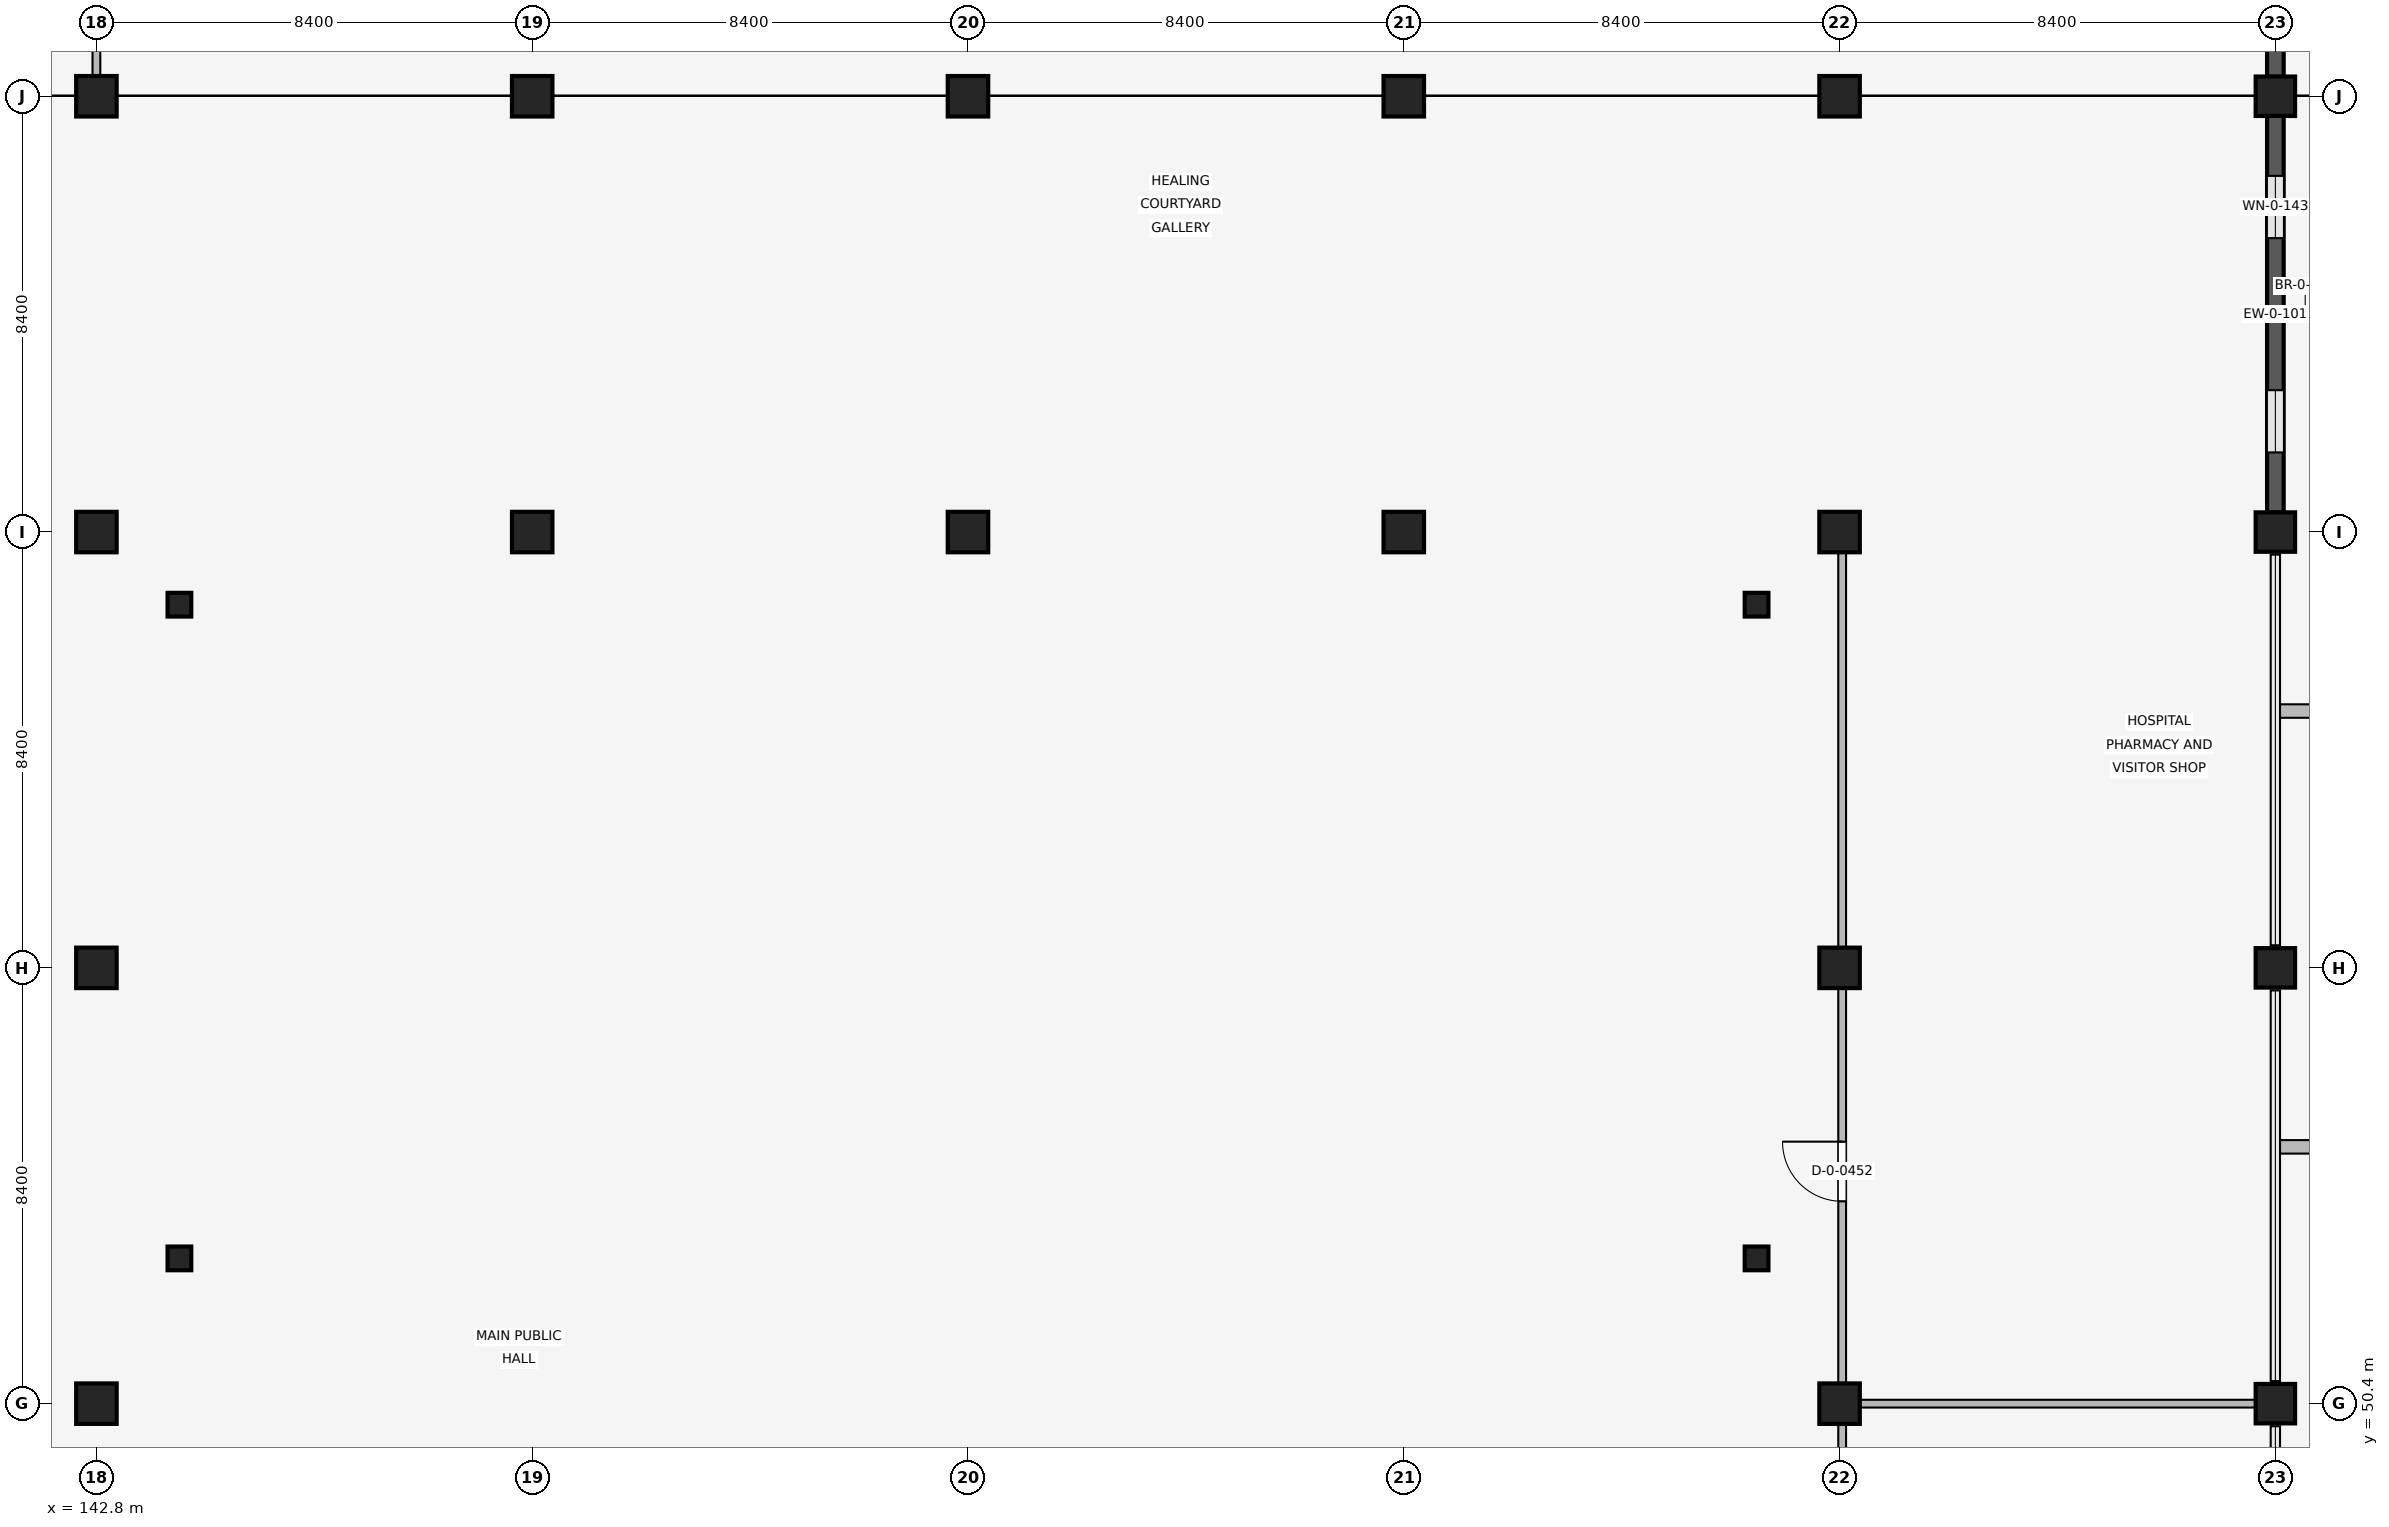
"""IFC4 building model, lengths in metres.
Left out: names, types, materials, properties, quantities, classifications, styles, units other than length and angle.
Written with IfcOpenShell. Run it as: python <this file> out.ifc"""

import sys

from ifc_helpers import new_model, si_unit, direction, frame, frame_2d, origin, origin_2d, place, context, subcontext, project, spatial, rectangle, hollow_circle, extrude, element, fill, save


model = new_model("IFC4")
c1 = context("Model", 3, precision=1e-05, world=origin(), true_north=direction((0.0, 1.0)))
c2 = subcontext(c1, "Body", "Model", "MODEL_VIEW")
j1 = project(units=[si_unit("LENGTHUNIT", "METRE"), si_unit("PLANEANGLEUNIT", "RADIAN")], contexts=[c1])
p1 = place(None, origin())
s1 = spatial("IfcSite", under=j1, at=p1, CompositionType="ELEMENT")
p2 = place(p1, origin())
s2 = spatial("IfcBuilding", under=s1, at=p2, CompositionType="ELEMENT")
p3 = place(p2, origin())
s3 = spatial("IfcBuildingStorey", under=s2, at=p3, CompositionType="ELEMENT", Elevation=0.0)
for number, where, z_axis, x_axis in (
    (1, (142.8, 50.4, 0.0), (0.0, 0.0, 1.0), (1.0, 0.0, 0.0)),
    (2, (142.8, 58.8, 0.0), (0.0, 0.0, 1.0), (1.0, 0.0, 0.0)),
    (3, (142.8, 67.2, 0.0), (0.0, 0.0, 1.0), (1.0, 0.0, 0.0)),
    (4, (142.8, 75.6, 0.0), (0.0, 0.0, 1.0), (1.0, 0.0, 0.0)),
    (5, (151.2, 67.2, 0.0), (0.0, 0.0, 1.0), (1.0, 0.0, 0.0)),
    (6, (151.2, 75.6, 0.0), (0.0, 0.0, 1.0), (1.0, 0.0, 0.0)),
    (7, (159.6, 67.2, 0.0), (0.0, 0.0, 1.0), (1.0, 0.0, 0.0)),
    (8, (159.6, 75.6, 0.0), (0.0, 0.0, 1.0), (1.0, 0.0, 0.0)),
    (9, (168.0, 67.2, 0.0), (0.0, 0.0, 1.0), (1.0, 0.0, 0.0)),
    (10, (168.0, 75.6, 0.0), (0.0, 0.0, 1.0), (1.0, 0.0, 0.0)),
    (11, (176.4, 50.4, 0.0), (0.0, 0.0, 1.0), (1.0, 0.0, 0.0)),
    (12, (176.4, 58.8, 0.0), (0.0, 0.0, 1.0), (1.0, 0.0, 0.0)),
    (13, (176.4, 67.2, 0.0), (0.0, 0.0, 1.0), (1.0, 0.0, 0.0)),
    (14, (176.4, 75.6, 0.0), (0.0, 0.0, 1.0), (1.0, 0.0, 0.0)),
):
    element("IfcColumn", number, at=place(p3, frame(where, z_axis=z_axis, x_axis=x_axis)), inside=s3, PredefinedType="COLUMN", context=c2, shape_type="SweptSolid", body=[
        extrude(rectangle(XDim=0.78, YDim=0.78, at=origin_2d()), origin(), (0.0, 0.0, 1.0), 4.8),
    ])
for number, where, z_axis, x_axis in (
    (15, (184.8, 50.4, 0.0), (0.0, 0.0, 1.0), (1.0, 0.0, 0.0)),
    (16, (184.8, 58.8, 0.0), (0.0, 0.0, 1.0), (1.0, 0.0, 0.0)),
    (17, (184.8, 67.2, 0.0), (0.0, 0.0, 1.0), (1.0, 0.0, 0.0)),
    (18, (184.8, 75.6, 0.0), (0.0, 0.0, 1.0), (1.0, 0.0, 0.0)),
):
    element("IfcColumn", number, at=place(p3, frame(where, z_axis=z_axis, x_axis=x_axis)), inside=s3, PredefinedType="COLUMN", context=c2, shape_type="SweptSolid", body=[
        extrude(rectangle(XDim=0.76, YDim=0.76, at=origin_2d()), origin(), (0.0, 0.0, 1.0), 4.8),
    ])
for number, where, z_axis, x_axis in (
    (19, (144.4, 53.2, 0.0), (0.0, 0.0, 1.0), (1.0, 0.0, 0.0)),
    (20, (144.4, 65.8, 0.0), (0.0, 0.0, 1.0), (1.0, 0.0, 0.0)),
    (21, (174.8, 53.2, 0.0), (0.0, 0.0, 1.0), (1.0, 0.0, 0.0)),
    (22, (174.8, 65.8, 0.0), (0.0, 0.0, 1.0), (1.0, 0.0, 0.0)),
):
    element("IfcColumn", number, at=place(p3, frame(where, z_axis=z_axis, x_axis=x_axis)), inside=s3, PredefinedType="COLUMN", context=c2, shape_type="SweptSolid", body=[
        extrude(hollow_circle(Radius=0.229, WallThickness=0.016, at=origin_2d()), origin(), (0.0, 0.0, 1.0), 4.8),
    ])
for number, where, z_axis, x_axis in (
    (23, (184.82, 55.35, 0.0), (0.0, 0.0, 1.0), (1.0, 0.0, 0.0)),
    (24, (184.82, 63.75, 0.0), (0.0, 0.0, 1.0), (1.0, 0.0, 0.0)),
):
    element("IfcWall", number, at=place(p3, frame(where, z_axis=z_axis, x_axis=x_axis)), inside=s3, PredefinedType="ELEMENTEDWALL", context=c2, shape_type="SweptSolid", body=[
        extrude(rectangle(XDim=1.03, YDim=0.26, at=frame_2d((0.515, 0.0))), origin(), (0.0, 0.0, 1.0), 3.82),
    ])
p4 = place(p3, frame((184.8, 75.225, 0.0), z_axis=(0.0, 0.0, 1.0), x_axis=(0.0, -1.0, 0.0)))
e25 = element("IfcWall", 25, at=p4, inside=s3, PredefinedType="SOLIDWALL", context=c2, shape_type="SweptSolid", body=[
    extrude(rectangle(XDim=7.65, YDim=0.32, at=frame_2d((3.825, 0.0))), origin(), (0.0, 0.0, 1.0), 3.82),
])
p5 = place(p4, frame((1.159, 0.0, 0.85)))
e26 = element("IfcOpeningElement", 26, at=p5, cuts=e25, PredefinedType="OPENING", context=c2, shape_type="SweptSolid", body=[
    extrude(rectangle(XDim=1.2, YDim=1.55, at=frame_2d((0.6, 0.775))), frame((0.0, 0.17, 0.0), z_axis=(0.0, -1.0, 0.0), x_axis=(1.0, 0.0, 0.0)), (0.0, 0.0, 1.0), 0.34),
])
p6 = place(p4, frame((5.291, 0.0, 0.85)))
e27 = element("IfcOpeningElement", 27, at=p6, cuts=e25, PredefinedType="OPENING", context=c2, shape_type="SweptSolid", body=[
    extrude(rectangle(XDim=1.2, YDim=1.55, at=frame_2d((0.6, 0.775))), frame((0.0, 0.17, 0.0), z_axis=(0.0, -1.0, 0.0), x_axis=(1.0, 0.0, 0.0)), (0.0, 0.0, 1.0), 0.34),
])
p7 = place(p3, frame((184.95, 71.4, 0.0), z_axis=(0.0, 0.0, 1.0), x_axis=(1.0, 0.0, 0.0)))
e28 = element("IfcWall", 28, at=p7, inside=s3, PredefinedType="ELEMENTEDWALL", context=c2, shape_type="SweptSolid", body=[
    extrude(rectangle(XDim=0.85, YDim=0.2, at=frame_2d((0.425, 0.0))), origin(), (0.0, 0.0, 1.0), 3.8),
])
p8 = place(p3, frame((184.8, 83.625, 0.0), z_axis=(0.0, 0.0, 1.0), x_axis=(0.0, -1.0, 0.0)))
e29 = element("IfcWall", 29, at=p8, inside=s3, PredefinedType="SOLIDWALL", context=c2, shape_type="SweptSolid", body=[
    extrude(rectangle(XDim=7.65, YDim=0.32, at=frame_2d((3.825, 0.0))), origin(), (0.0, 0.0, 1.0), 3.82),
])
p9 = place(p8, frame((2.75, 0.0, 0.0)))
e30 = element("IfcOpeningElement", 30, at=p9, cuts=e29, PredefinedType="OPENING", context=c2, shape_type="SweptSolid", body=[
    extrude(rectangle(XDim=2.15, YDim=2.5, at=frame_2d((1.075, 1.25))), frame((0.0, 0.17, 0.0), z_axis=(0.0, -1.0, 0.0), x_axis=(1.0, 0.0, 0.0)), (0.0, 0.0, 1.0), 0.34),
])
p10 = place(p3, frame((142.8, 76.0, 0.0), z_axis=(0.0, 0.0, 1.0), x_axis=(0.0, 1.0, 0.0)))
e31 = element("IfcWall", 31, at=p10, inside=s3, PredefinedType="PARTITIONING", context=c2, shape_type="SweptSolid", body=[
    extrude(rectangle(XDim=16.0, YDim=0.15, at=frame_2d((8.0, 0.0))), origin(), (0.0, 0.0, 1.0), 3.8),
])
p11 = place(p10, frame((3.4, 0.0, 0.0)))
e32 = element("IfcOpeningElement", 32, at=p11, cuts=e31, PredefinedType="OPENING", context=c2, shape_type="SweptSolid", body=[
    extrude(rectangle(XDim=1.85, YDim=2.3, at=frame_2d((0.925, 1.15))), frame((0.0, 0.085, 0.0), z_axis=(0.0, -1.0, 0.0), x_axis=(1.0, 0.0, 0.0)), (0.0, 0.0, 1.0), 0.17),
])
p12 = place(p3, frame((176.45, 32.1, 0.0), z_axis=(0.0, 0.0, 1.0), x_axis=(0.0, 1.0, 0.0)))
e33 = element("IfcWall", 33, at=p12, inside=s3, PredefinedType="PARTITIONING", context=c2, shape_type="SweptSolid", body=[
    extrude(rectangle(XDim=17.9, YDim=0.15, at=frame_2d((8.95, 0.0))), origin(), (0.0, 0.0, 1.0), 3.8),
])
p13 = place(p12, frame((4.6, 0.0, 0.0)))
e34 = element("IfcOpeningElement", 34, at=p13, cuts=e33, PredefinedType="OPENING", context=c2, shape_type="SweptSolid", body=[
    extrude(rectangle(XDim=1.9, YDim=2.4, at=frame_2d((0.95, 1.2))), frame((0.0, 0.085, 0.0), z_axis=(0.0, -1.0, 0.0), x_axis=(1.0, 0.0, 0.0)), (0.0, 0.0, 1.0), 0.17),
])
p14 = place(p3, frame((176.45, 50.4, 0.0), z_axis=(0.0, 0.0, 1.0), x_axis=(1.0, 0.0, 0.0)))
e35 = element("IfcWall", 35, at=p14, inside=s3, PredefinedType="PARTITIONING", context=c2, shape_type="SweptSolid", body=[
    extrude(rectangle(XDim=8.29, YDim=0.15, at=frame_2d((4.145, 0.0))), origin(), (0.0, 0.0, 1.0), 3.8),
])
p15 = place(p3, frame((176.45, 50.8, 0.0), z_axis=(0.0, 0.0, 1.0), x_axis=(0.0, 1.0, 0.0)))
e36 = element("IfcWall", 36, at=p15, inside=s3, PredefinedType="PARTITIONING", context=c2, shape_type="SweptSolid", body=[
    extrude(rectangle(XDim=16.0, YDim=0.15, at=frame_2d((8.0, 0.0))), origin(), (0.0, 0.0, 1.0), 3.8),
])
p16 = place(p15, frame((3.5, 0.0, 0.0)))
e37 = element("IfcOpeningElement", 37, at=p16, cuts=e36, PredefinedType="OPENING", context=c2, shape_type="SweptSolid", body=[
    extrude(rectangle(XDim=1.15, YDim=2.2, at=frame_2d((0.575, 1.1))), frame((0.0, 0.085, 0.0), z_axis=(0.0, -1.0, 0.0), x_axis=(1.0, 0.0, 0.0)), (0.0, 0.0, 1.0), 0.17),
])
p17 = place(p5, origin())
e38 = element("IfcWindow", 38, at=p17, inside=s3, PartitioningType="SINGLE_PANEL", PredefinedType="WINDOW", context=c2, shape_type="SweptSolid", body=[
    extrude(rectangle(XDim=1.2, YDim=1.55, at=frame_2d((0.6, 0.775))), frame((0.0, 0.03, 0.0), z_axis=(0.0, -1.0, 0.0), x_axis=(1.0, 0.0, 0.0)), (0.0, 0.0, 1.0), 0.06),
])
fill(e26, e38)
p18 = place(p6, origin())
e39 = element("IfcWindow", 39, at=p18, inside=s3, PartitioningType="SINGLE_PANEL", PredefinedType="WINDOW", context=c2, shape_type="SweptSolid", body=[
    extrude(rectangle(XDim=1.2, YDim=1.55, at=frame_2d((0.6, 0.775))), frame((0.0, 0.03, 0.0), z_axis=(0.0, -1.0, 0.0), x_axis=(1.0, 0.0, 0.0)), (0.0, 0.0, 1.0), 0.06),
])
fill(e27, e39)
p19 = place(p16, origin())
e40 = element("IfcDoor", 40, at=p19, inside=s3, OperationType="SINGLE_SWING_RIGHT", PredefinedType="DOOR", context=c2, shape_type="SweptSolid", body=[
    extrude(rectangle(XDim=1.15, YDim=2.2, at=frame_2d((0.575, 1.1))), frame((0.0, 0.025, 0.0), z_axis=(0.0, -1.0, 0.0), x_axis=(1.0, 0.0, 0.0)), (0.0, 0.0, 1.0), 0.05),
])
fill(e37, e40)
save(model, sys.argv[1])
